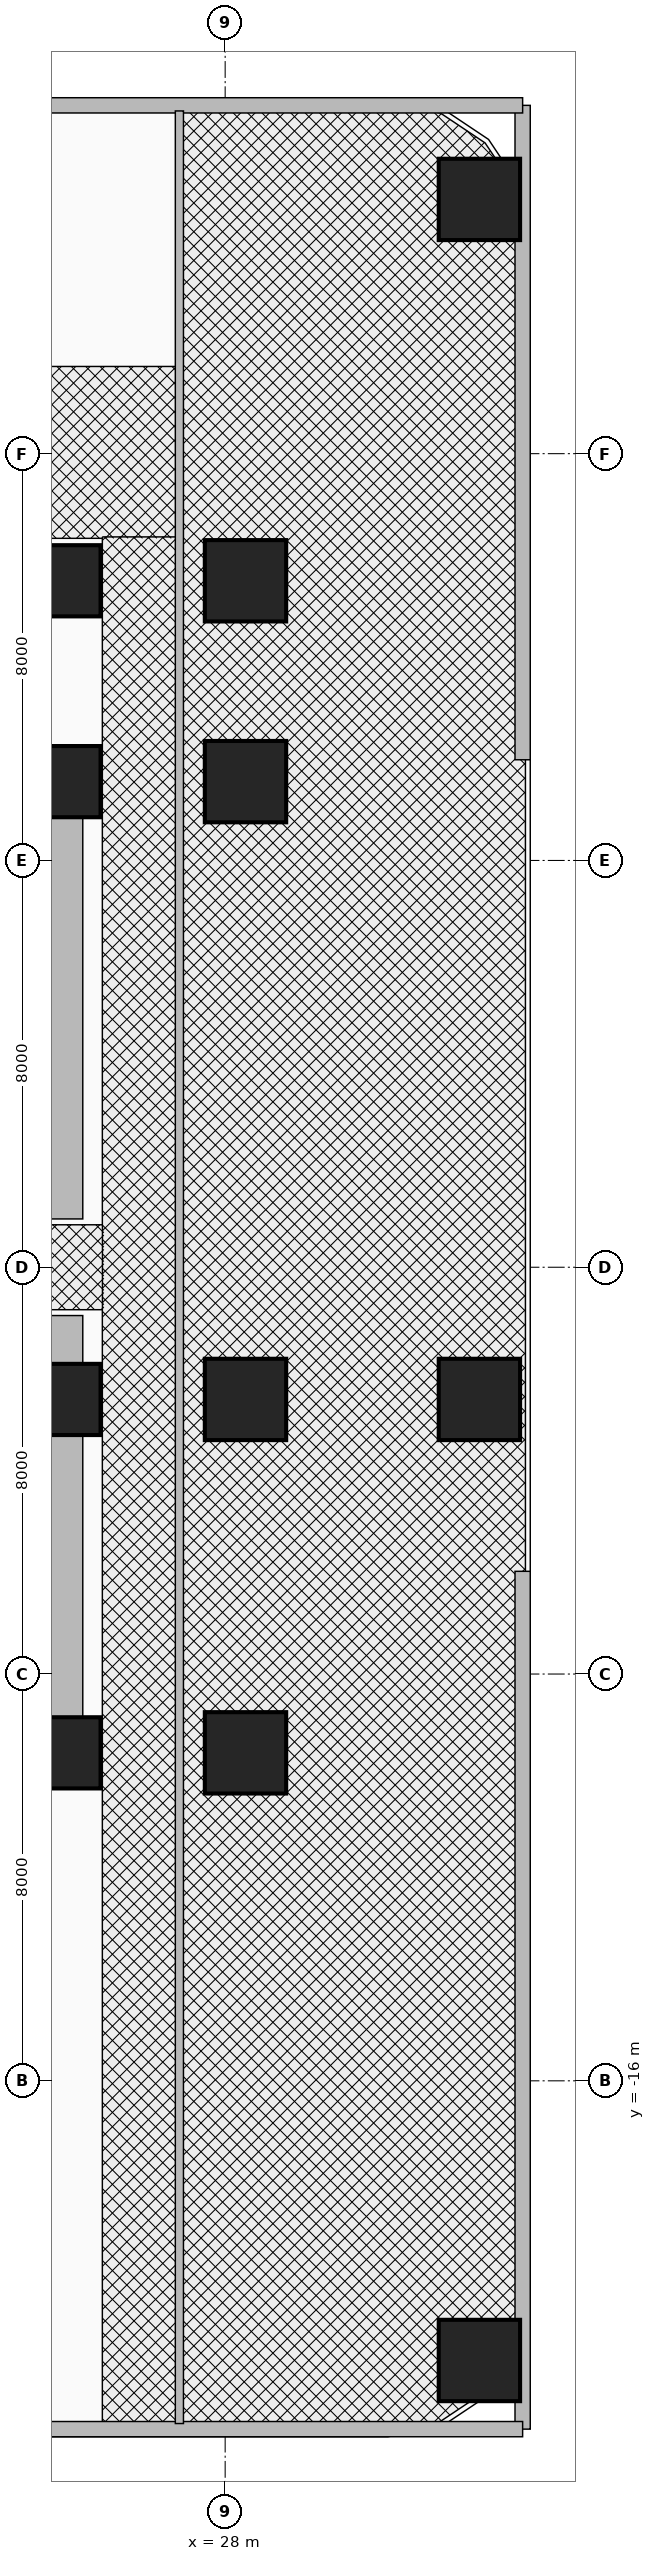
"""IFC4 building model, lengths in metres.
Left out: names, types, materials, properties, quantities, classifications, styles, units other than length and angle.
Written with IfcOpenShell. Run it as: python <this file> out.ifc"""

import sys

from ifc_helpers import new_model, si_unit, direction, frame, frame_2d, origin, origin_2d, place, context, subcontext, project, spatial, rectangle, extrude, source, transform, mapped, element, fill, save


model = new_model("IFC4")
c1 = context("Model", 3, precision=1e-05, world=origin(), true_north=direction((0.0, 1.0)))
c2 = subcontext(c1, "Body", "Model", "MODEL_VIEW")
j1 = project(units=[si_unit("LENGTHUNIT", "METRE"), si_unit("PLANEANGLEUNIT", "RADIAN")], contexts=[c1])
p1 = place(None, origin())
s1 = spatial("IfcSite", under=j1, at=p1, CompositionType="ELEMENT")
p2 = place(p1, origin())
s2 = spatial("IfcBuilding", under=s1, at=p2, CompositionType="ELEMENT")
p3 = place(p2, frame((0.0, 0.0, 20.8)))
s3 = spatial("IfcBuildingStorey", under=s2, at=p3, CompositionType="ELEMENT", Elevation=20.8)
for number, where, z_axis, x_axis in (
    (1, (24.85, -9.9, 0.0), (0.0, 0.0, 1.0), (0.0, 1.0, 0.0)),
    (2, (24.85, 0.95, 0.0), (0.0, 0.0, 1.0), (0.0, 1.0, 0.0)),
):
    element("IfcWall", number, at=place(p3, frame(where, z_axis=z_axis, x_axis=x_axis)), inside=s3, PredefinedType="SHEAR", context=c2, shape_type="SweptSolid", body=[
        extrude(rectangle(XDim=8.95, YDim=0.7, at=frame_2d((4.475, 0.0))), origin(), (0.0, 0.0, 1.0), 4.96),
    ])
for number, where, z_axis, x_axis in (
    (3, (15.85, 9.55, 0.0), (0.0, 0.0, 1.0), (1.0, 0.0, 0.0)),
    (4, (15.85, -9.55, 0.0), (0.0, 0.0, 1.0), (1.0, 0.0, 0.0)),
):
    element("IfcWall", number, at=place(p3, frame(where, z_axis=z_axis, x_axis=x_axis)), inside=s3, PredefinedType="SHEAR", context=c2, shape_type="SweptSolid", body=[
        extrude(rectangle(XDim=9.0, YDim=0.7, at=frame_2d((4.5, 0.0))), origin(), (0.0, 0.0, 1.0), 4.96),
    ])
m1 = source(origin(), c2, "Body", "SweptSolid", [
    extrude(rectangle(XDim=1.4, YDim=1.4, at=origin_2d()), origin(), (0.0, 0.0, 1.0), 5.2),
])
p4 = place(p3, frame((24.85, -9.55, 0.0), z_axis=(0.0, 0.0, 1.0), x_axis=(1.0, 0.0, 0.0)))
e5 = element("IfcColumn", 5, at=p4, inside=s3, PredefinedType="COLUMN", context=c2, shape_type="MappedRepresentation", body=[
    mapped(m1, transform((0.0, 0.0, 0.0), x_axis=(1.0, 0.0, 0.0), y_axis=(0.0, 1.0, 0.0), z_axis=(0.0, 0.0, 1.0), scale=1.0)),
])
m2 = source(origin(), c2, "Body", "SweptSolid", [
    extrude(rectangle(XDim=1.6, YDim=1.6, at=origin_2d()), origin(), (0.0, 0.0, 1.0), 5.2),
])
p5 = place(p3, frame((28.4, -9.55, 0.0), z_axis=(0.0, 0.0, 1.0), x_axis=(1.0, 0.0, 0.0)))
e6 = element("IfcColumn", 6, at=p5, inside=s3, PredefinedType="COLUMN", context=c2, shape_type="MappedRepresentation", body=[
    mapped(m2, transform((0.0, 0.0, 0.0), x_axis=(1.0, 0.0, 0.0), y_axis=(0.0, 1.0, 0.0), z_axis=(0.0, 0.0, 1.0), scale=1.0)),
])
p6 = place(p3, frame((24.85, -2.6, 0.0), z_axis=(0.0, 0.0, 1.0), x_axis=(1.0, 0.0, 0.0)))
e7 = element("IfcColumn", 7, at=p6, inside=s3, PredefinedType="COLUMN", context=c2, shape_type="MappedRepresentation", body=[
    mapped(m1, transform((0.0, 0.0, 0.0), x_axis=(1.0, 0.0, 0.0), y_axis=(0.0, 1.0, 0.0), z_axis=(0.0, 0.0, 1.0), scale=1.0)),
])
p7 = place(p3, frame((28.4, -2.6, 0.0), z_axis=(0.0, 0.0, 1.0), x_axis=(1.0, 0.0, 0.0)))
e8 = element("IfcColumn", 8, at=p7, inside=s3, PredefinedType="COLUMN", context=c2, shape_type="MappedRepresentation", body=[
    mapped(m2, transform((0.0, 0.0, 0.0), x_axis=(1.0, 0.0, 0.0), y_axis=(0.0, 1.0, 0.0), z_axis=(0.0, 0.0, 1.0), scale=1.0)),
])
p8 = place(p3, frame((24.85, 9.55, 0.0), z_axis=(0.0, 0.0, 1.0), x_axis=(1.0, 0.0, 0.0)))
e9 = element("IfcColumn", 9, at=p8, inside=s3, PredefinedType="COLUMN", context=c2, shape_type="MappedRepresentation", body=[
    mapped(m1, transform((0.0, 0.0, 0.0), x_axis=(1.0, 0.0, 0.0), y_axis=(0.0, 1.0, 0.0), z_axis=(0.0, 0.0, 1.0), scale=1.0)),
])
p9 = place(p3, frame((28.4, 9.55, 0.0), z_axis=(0.0, 0.0, 1.0), x_axis=(1.0, 0.0, 0.0)))
e10 = element("IfcColumn", 10, at=p9, inside=s3, PredefinedType="COLUMN", context=c2, shape_type="MappedRepresentation", body=[
    mapped(m2, transform((0.0, 0.0, 0.0), x_axis=(1.0, 0.0, 0.0), y_axis=(0.0, 1.0, 0.0), z_axis=(0.0, 0.0, 1.0), scale=1.0)),
])
p10 = place(p3, frame((24.85, 13.5, 0.0), z_axis=(0.0, 0.0, 1.0), x_axis=(1.0, 0.0, 0.0)))
e11 = element("IfcColumn", 11, at=p10, inside=s3, PredefinedType="COLUMN", context=c2, shape_type="MappedRepresentation", body=[
    mapped(m1, transform((0.0, 0.0, 0.0), x_axis=(1.0, 0.0, 0.0), y_axis=(0.0, 1.0, 0.0), z_axis=(0.0, 0.0, 1.0), scale=1.0)),
])
for number, where, z_axis, x_axis in (
    (12, (28.4, 13.5, 0.0), (0.0, 0.0, 1.0), (1.0, 0.0, 0.0)),
    (13, (33.0, 21.0, 0.0), (0.0, 0.0, 1.0), (1.0, 0.0, 0.0)),
    (14, (33.0, -2.6, 0.0), (0.0, 0.0, 1.0), (1.0, 0.0, 0.0)),
    (15, (33.0, -21.5, 0.0), (0.0, 0.0, 1.0), (1.0, 0.0, 0.0)),
):
    element("IfcColumn", number, at=place(p3, frame(where, z_axis=z_axis, x_axis=x_axis)), inside=s3, PredefinedType="COLUMN", context=c2, shape_type="MappedRepresentation", body=[
        mapped(m2, transform((0.0, 0.0, 0.0), x_axis=(1.0, 0.0, 0.0), y_axis=(0.0, 1.0, 0.0), z_axis=(0.0, 0.0, 1.0), scale=1.0)),
    ])
p11 = place(p3, frame((33.85, -22.85, 0.0), z_axis=(0.0, 0.0, 1.0), x_axis=(0.0, 1.0, 0.0)))
e16 = element("IfcWall", 16, at=p11, inside=s3, PredefinedType="SOLIDWALL", context=c2, shape_type="SweptSolid", body=[
    extrude(rectangle(XDim=16.87, YDim=0.3, at=frame_2d((8.435, 0.0))), origin(), (0.0, 0.0, 1.0), 4.96),
])
p12 = place(p11, frame((3.0, 0.0, 0.9)))
e17 = element("IfcOpeningElement", 17, at=p12, cuts=e16, PredefinedType="OPENING", context=c2, shape_type="SweptSolid", body=[
    extrude(rectangle(XDim=1.5, YDim=1.75, at=frame_2d((0.75, 0.875))), frame((0.0, 0.165, 0.0), z_axis=(0.0, -1.0, 0.0), x_axis=(1.0, 0.0, 0.0)), (0.0, 0.0, 1.0), 0.33),
])
p13 = place(p11, frame((8.2, 0.0, 0.9)))
e18 = element("IfcOpeningElement", 18, at=p13, cuts=e16, PredefinedType="OPENING", context=c2, shape_type="SweptSolid", body=[
    extrude(rectangle(XDim=1.5, YDim=1.75, at=frame_2d((0.75, 0.875))), frame((0.0, 0.165, 0.0), z_axis=(0.0, -1.0, 0.0), x_axis=(1.0, 0.0, 0.0)), (0.0, 0.0, 1.0), 0.33),
])
p14 = place(p11, frame((13.4, 0.0, 0.9)))
e19 = element("IfcOpeningElement", 19, at=p14, cuts=e16, PredefinedType="OPENING", context=c2, shape_type="SweptSolid", body=[
    extrude(rectangle(XDim=1.5, YDim=1.75, at=frame_2d((0.75, 0.875))), frame((0.0, 0.165, 0.0), z_axis=(0.0, -1.0, 0.0), x_axis=(1.0, 0.0, 0.0)), (0.0, 0.0, 1.0), 0.33),
])
p15 = place(p3, frame((33.85, 9.98, 0.0), z_axis=(0.0, 0.0, 1.0), x_axis=(0.0, 1.0, 0.0)))
e20 = element("IfcWall", 20, at=p15, inside=s3, PredefinedType="SOLIDWALL", context=c2, shape_type="SweptSolid", body=[
    extrude(rectangle(XDim=12.87, YDim=0.3, at=frame_2d((6.435, 0.0))), origin(), (0.0, 0.0, 1.0), 4.96),
])
p16 = place(p15, frame((3.0, 0.0, 0.9)))
e21 = element("IfcOpeningElement", 21, at=p16, cuts=e20, PredefinedType="OPENING", context=c2, shape_type="SweptSolid", body=[
    extrude(rectangle(XDim=1.5, YDim=1.75, at=frame_2d((0.75, 0.875))), frame((0.0, 0.165, 0.0), z_axis=(0.0, -1.0, 0.0), x_axis=(1.0, 0.0, 0.0)), (0.0, 0.0, 1.0), 0.33),
])
p17 = place(p15, frame((8.2, 0.0, 0.9)))
e22 = element("IfcOpeningElement", 22, at=p17, cuts=e20, PredefinedType="OPENING", context=c2, shape_type="SweptSolid", body=[
    extrude(rectangle(XDim=1.5, YDim=1.75, at=frame_2d((0.75, 0.875))), frame((0.0, 0.165, 0.0), z_axis=(0.0, -1.0, 0.0), x_axis=(1.0, 0.0, 0.0)), (0.0, 0.0, 1.0), 0.33),
])
p18 = place(p3, frame((12.16, -22.85, 0.0), z_axis=(0.0, 0.0, 1.0), x_axis=(1.0, 0.0, 0.0)))
e23 = element("IfcWall", 23, at=p18, inside=s3, PredefinedType="SOLIDWALL", context=c2, shape_type="SweptSolid", body=[
    extrude(rectangle(XDim=21.69, YDim=0.3, at=frame_2d((10.845, 0.0))), origin(), (0.0, 0.0, 1.0), 4.96),
])
p19 = place(p18, frame((3.2, 0.0, 0.9)))
e24 = element("IfcOpeningElement", 24, at=p19, cuts=e23, PredefinedType="OPENING", context=c2, shape_type="SweptSolid", body=[
    extrude(rectangle(XDim=1.5, YDim=1.75, at=frame_2d((0.75, 0.875))), frame((0.0, 0.165, 0.0), z_axis=(0.0, -1.0, 0.0), x_axis=(1.0, 0.0, 0.0)), (0.0, 0.0, 1.0), 0.33),
])
p20 = place(p18, frame((9.8, 0.0, 0.9)))
e25 = element("IfcOpeningElement", 25, at=p20, cuts=e23, PredefinedType="OPENING", context=c2, shape_type="SweptSolid", body=[
    extrude(rectangle(XDim=1.5, YDim=1.75, at=frame_2d((0.75, 0.875))), frame((0.0, 0.165, 0.0), z_axis=(0.0, -1.0, 0.0), x_axis=(1.0, 0.0, 0.0)), (0.0, 0.0, 1.0), 0.33),
])
p21 = place(p18, frame((17.6, 0.0, 0.9)))
e26 = element("IfcOpeningElement", 26, at=p21, cuts=e23, PredefinedType="OPENING", context=c2, shape_type="SweptSolid", body=[
    extrude(rectangle(XDim=1.5, YDim=1.75, at=frame_2d((0.75, 0.875))), frame((0.0, 0.165, 0.0), z_axis=(0.0, -1.0, 0.0), x_axis=(1.0, 0.0, 0.0)), (0.0, 0.0, 1.0), 0.33),
])
p22 = place(p3, frame((9.98, 22.85, 0.0), z_axis=(0.0, 0.0, 1.0), x_axis=(1.0, 0.0, 0.0)))
e27 = element("IfcWall", 27, at=p22, inside=s3, PredefinedType="SOLIDWALL", context=c2, shape_type="SweptSolid", body=[
    extrude(rectangle(XDim=23.87, YDim=0.3, at=frame_2d((11.935, 0.0))), origin(), (0.0, 0.0, 1.0), 4.96),
])
p23 = place(p22, frame((3.2, 0.0, 0.9)))
e28 = element("IfcOpeningElement", 28, at=p23, cuts=e27, PredefinedType="OPENING", context=c2, shape_type="SweptSolid", body=[
    extrude(rectangle(XDim=1.5, YDim=1.75, at=frame_2d((0.75, 0.875))), frame((0.0, 0.165, 0.0), z_axis=(0.0, -1.0, 0.0), x_axis=(1.0, 0.0, 0.0)), (0.0, 0.0, 1.0), 0.33),
])
p24 = place(p22, frame((10.0, 0.0, 0.9)))
e29 = element("IfcOpeningElement", 29, at=p24, cuts=e27, PredefinedType="OPENING", context=c2, shape_type="SweptSolid", body=[
    extrude(rectangle(XDim=1.5, YDim=1.75, at=frame_2d((0.75, 0.875))), frame((0.0, 0.165, 0.0), z_axis=(0.0, -1.0, 0.0), x_axis=(1.0, 0.0, 0.0)), (0.0, 0.0, 1.0), 0.33),
])
p25 = place(p22, frame((17.8, 0.0, 0.9)))
e30 = element("IfcOpeningElement", 30, at=p25, cuts=e27, PredefinedType="OPENING", context=c2, shape_type="SweptSolid", body=[
    extrude(rectangle(XDim=1.5, YDim=1.75, at=frame_2d((0.75, 0.875))), frame((0.0, 0.165, 0.0), z_axis=(0.0, -1.0, 0.0), x_axis=(1.0, 0.0, 0.0)), (0.0, 0.0, 1.0), 0.33),
])
p26 = place(p3, frame((27.1, -22.74, 0.0), z_axis=(0.0, 0.0, 1.0), x_axis=(0.0, 1.0, 0.0)))
e31 = element("IfcWall", 31, at=p26, inside=s3, PredefinedType="PARTITIONING", context=c2, shape_type="SweptSolid", body=[
    extrude(rectangle(XDim=45.48, YDim=0.16, at=frame_2d((22.74, 0.0))), origin(), (0.0, 0.0, 1.0), 3.745),
])
p27 = place(p26, frame((7.0, 0.0, 0.0)))
e32 = element("IfcOpeningElement", 32, at=p27, cuts=e31, PredefinedType="OPENING", context=c2, shape_type="SweptSolid", body=[
    extrude(rectangle(XDim=1.8, YDim=2.15, at=frame_2d((0.9, 1.075))), frame((0.0, 0.095, 0.0), z_axis=(0.0, -1.0, 0.0), x_axis=(1.0, 0.0, 0.0)), (0.0, 0.0, 1.0), 0.19),
])
p28 = place(p26, frame((25.0, 0.0, 0.0)))
e33 = element("IfcOpeningElement", 33, at=p28, cuts=e31, PredefinedType="OPENING", context=c2, shape_type="SweptSolid", body=[
    extrude(rectangle(XDim=1.8, YDim=2.15, at=frame_2d((0.9, 1.075))), frame((0.0, 0.095, 0.0), z_axis=(0.0, -1.0, 0.0), x_axis=(1.0, 0.0, 0.0)), (0.0, 0.0, 1.0), 0.19),
])
p29 = place(p12, origin())
e34 = element("IfcWindow", 34, at=p29, inside=s3, PartitioningType="SINGLE_PANEL", PredefinedType="WINDOW", context=c2, shape_type="SweptSolid", body=[
    extrude(rectangle(XDim=1.5, YDim=1.75, at=frame_2d((0.75, 0.875))), frame((0.0, 0.03, 0.0), z_axis=(0.0, -1.0, 0.0), x_axis=(1.0, 0.0, 0.0)), (0.0, 0.0, 1.0), 0.06),
])
fill(e17, e34)
p30 = place(p13, origin())
e35 = element("IfcWindow", 35, at=p30, inside=s3, PartitioningType="SINGLE_PANEL", PredefinedType="WINDOW", context=c2, shape_type="SweptSolid", body=[
    extrude(rectangle(XDim=1.5, YDim=1.75, at=frame_2d((0.75, 0.875))), frame((0.0, 0.03, 0.0), z_axis=(0.0, -1.0, 0.0), x_axis=(1.0, 0.0, 0.0)), (0.0, 0.0, 1.0), 0.06),
])
fill(e18, e35)
p31 = place(p14, origin())
e36 = element("IfcWindow", 36, at=p31, inside=s3, PartitioningType="SINGLE_PANEL", PredefinedType="WINDOW", context=c2, shape_type="SweptSolid", body=[
    extrude(rectangle(XDim=1.5, YDim=1.75, at=frame_2d((0.75, 0.875))), frame((0.0, 0.03, 0.0), z_axis=(0.0, -1.0, 0.0), x_axis=(1.0, 0.0, 0.0)), (0.0, 0.0, 1.0), 0.06),
])
fill(e19, e36)
p32 = place(p16, origin())
e37 = element("IfcWindow", 37, at=p32, inside=s3, PartitioningType="SINGLE_PANEL", PredefinedType="WINDOW", context=c2, shape_type="SweptSolid", body=[
    extrude(rectangle(XDim=1.5, YDim=1.75, at=frame_2d((0.75, 0.875))), frame((0.0, 0.03, 0.0), z_axis=(0.0, -1.0, 0.0), x_axis=(1.0, 0.0, 0.0)), (0.0, 0.0, 1.0), 0.06),
])
fill(e21, e37)
p33 = place(p17, origin())
e38 = element("IfcWindow", 38, at=p33, inside=s3, PartitioningType="SINGLE_PANEL", PredefinedType="WINDOW", context=c2, shape_type="SweptSolid", body=[
    extrude(rectangle(XDim=1.5, YDim=1.75, at=frame_2d((0.75, 0.875))), frame((0.0, 0.03, 0.0), z_axis=(0.0, -1.0, 0.0), x_axis=(1.0, 0.0, 0.0)), (0.0, 0.0, 1.0), 0.06),
])
fill(e22, e38)
p34 = place(p21, origin())
e39 = element("IfcWindow", 39, at=p34, inside=s3, PartitioningType="SINGLE_PANEL", PredefinedType="WINDOW", context=c2, shape_type="SweptSolid", body=[
    extrude(rectangle(XDim=1.5, YDim=1.75, at=frame_2d((0.75, 0.875))), frame((0.0, 0.03, 0.0), z_axis=(0.0, -1.0, 0.0), x_axis=(1.0, 0.0, 0.0)), (0.0, 0.0, 1.0), 0.06),
])
fill(e26, e39)
p35 = place(p25, origin())
e40 = element("IfcWindow", 40, at=p35, inside=s3, PartitioningType="SINGLE_PANEL", PredefinedType="WINDOW", context=c2, shape_type="SweptSolid", body=[
    extrude(rectangle(XDim=1.5, YDim=1.75, at=frame_2d((0.75, 0.875))), frame((0.0, 0.03, 0.0), z_axis=(0.0, -1.0, 0.0), x_axis=(1.0, 0.0, 0.0)), (0.0, 0.0, 1.0), 0.06),
])
fill(e30, e40)
p36 = place(p27, frame((1.8, 0.0, 0.0), z_axis=(0.0, 0.0, 1.0), x_axis=(-1.0, 0.0, 0.0)))
e41 = element("IfcDoor", 41, at=p36, inside=s3, OperationType="DOUBLE_DOOR_SINGLE_SWING", PredefinedType="DOOR", context=c2, shape_type="SweptSolid", body=[
    extrude(rectangle(XDim=1.8, YDim=2.15, at=frame_2d((0.9, 1.075))), frame((0.0, 0.025, 0.0), z_axis=(0.0, -1.0, 0.0), x_axis=(1.0, 0.0, 0.0)), (0.0, 0.0, 1.0), 0.05),
])
fill(e32, e41)
p37 = place(p28, origin())
e42 = element("IfcDoor", 42, at=p37, inside=s3, OperationType="DOUBLE_DOOR_SINGLE_SWING", PredefinedType="DOOR", context=c2, shape_type="SweptSolid", body=[
    extrude(rectangle(XDim=1.8, YDim=2.15, at=frame_2d((0.9, 1.075))), frame((0.0, 0.025, 0.0), z_axis=(0.0, -1.0, 0.0), x_axis=(1.0, 0.0, 0.0)), (0.0, 0.0, 1.0), 0.05),
])
fill(e33, e42)
save(model, sys.argv[1])
